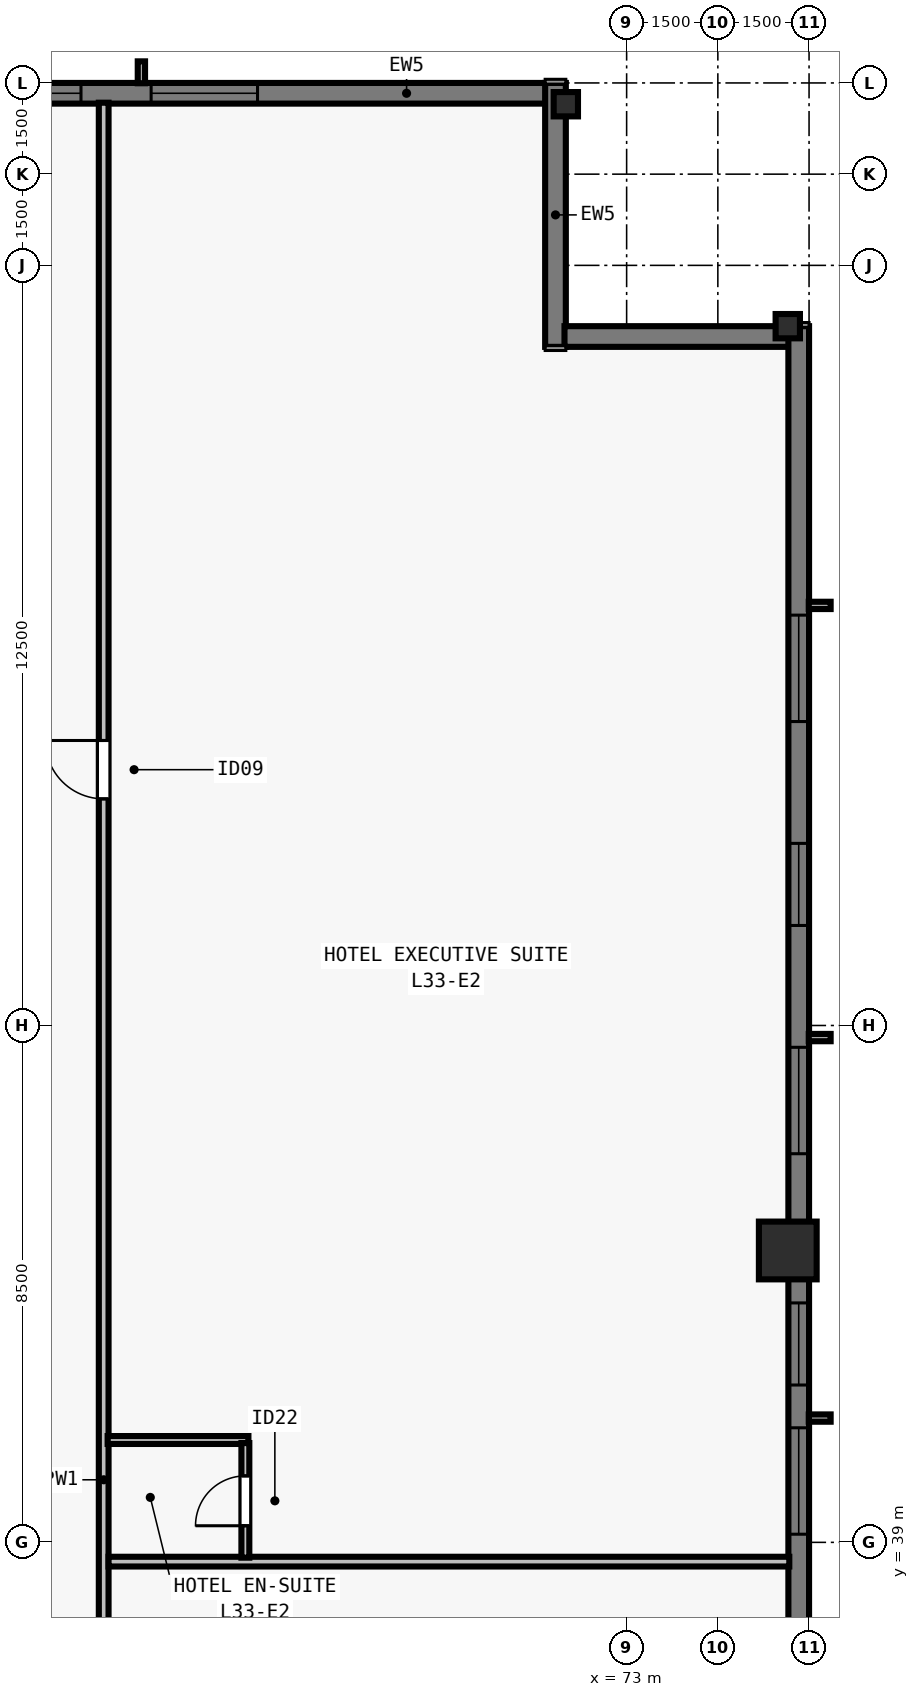
"""IFC4 building model, lengths in metres.
Left out: names, types, materials, properties, quantities, classifications, styles, units other than length and angle.
Written with IfcOpenShell. Run it as: python <this file> out.ifc"""

import sys

from ifc_helpers import new_model, si_unit, direction, frame, frame_2d, origin, origin_2d, place, context, subcontext, project, spatial, rectangle, i_section, extrude, element, fill, save


model = new_model("IFC4")
c1 = context("Model", 3, precision=1e-05, world=origin(), true_north=direction((0.0, 1.0)))
c2 = subcontext(c1, "Body", "Model", "MODEL_VIEW")
j1 = project(units=[si_unit("LENGTHUNIT", "METRE"), si_unit("PLANEANGLEUNIT", "RADIAN")], contexts=[c1])
p1 = place(None, origin())
s1 = spatial("IfcSite", under=j1, at=p1, CompositionType="ELEMENT")
p2 = place(p1, origin())
s2 = spatial("IfcBuilding", under=s1, at=p2, CompositionType="ELEMENT")
p3 = place(p2, frame((0.0, 0.0, 123.5)))
s3 = spatial("IfcBuildingStorey", under=s2, at=p3, CompositionType="ELEMENT", Elevation=123.5)
p4 = place(p3, frame((75.65, 43.8, 0.0), z_axis=(0.0, 0.0, 1.0), x_axis=(0.0, 1.0, 0.0)))
e1 = element("IfcColumn", 1, at=p4, inside=s3, PredefinedType="COLUMN", context=c2, shape_type="SweptSolid", body=[
    extrude(rectangle(XDim=0.95, YDim=0.95, at=origin_2d()), origin(), (0.0, 0.0, 1.0), 3.5),
])
for number, where, z_axis, x_axis in (
    (2, (75.65, 59.0, 0.0), (0.0, 0.0, 1.0), (0.0, 1.0, 0.0)),
    (3, (72.0, 62.65, 0.0), (0.0, 0.0, 1.0), (1.0, 0.0, 0.0)),
):
    element("IfcColumn", number, at=place(p3, frame(where, z_axis=z_axis, x_axis=x_axis)), inside=s3, PredefinedType="COLUMN", context=c2, shape_type="SweptSolid", body=[
        extrude(i_section(OverallWidth=0.4, OverallDepth=0.4, WebThickness=0.022, FlangeThickness=0.036, at=origin_2d()), origin(), (0.0, 0.0, 1.0), 3.5),
    ])
p5 = place(p3, frame((32.0, 62.83, 0.0), z_axis=(0.0, 0.0, 1.0), x_axis=(1.0, 0.0, 0.0)))
e4 = element("IfcWall", 4, at=p5, inside=s3, PredefinedType="SOLIDWALL", context=c2, shape_type="SweptSolid", body=[
    extrude(rectangle(XDim=39.682, YDim=0.34, at=frame_2d((19.841, 0.0))), origin(), (0.0, 0.0, 1.0), 3.28),
])
p6 = place(p5, frame((3.902, 0.0, 0.8)))
e5 = element("IfcOpeningElement", 5, at=p6, cuts=e4, PredefinedType="OPENING", context=c2, shape_type="SweptSolid", body=[
    extrude(rectangle(XDim=1.75, YDim=1.66, at=frame_2d((0.875, 0.83))), frame((0.0, 0.18, 0.0), z_axis=(0.0, -1.0, 0.0), x_axis=(1.0, 0.0, 0.0)), (0.0, 0.0, 1.0), 0.36),
])
p7 = place(p5, frame((8.505, 0.0, 0.8)))
e6 = element("IfcOpeningElement", 6, at=p7, cuts=e4, PredefinedType="OPENING", context=c2, shape_type="SweptSolid", body=[
    extrude(rectangle(XDim=1.35, YDim=1.66, at=frame_2d((0.675, 0.83))), frame((0.0, 0.18, 0.0), z_axis=(0.0, -1.0, 0.0), x_axis=(1.0, 0.0, 0.0)), (0.0, 0.0, 1.0), 0.36),
])
p8 = place(p5, frame((11.859, 0.0, 0.8)))
e7 = element("IfcOpeningElement", 7, at=p8, cuts=e4, PredefinedType="OPENING", context=c2, shape_type="SweptSolid", body=[
    extrude(rectangle(XDim=1.75, YDim=1.66, at=frame_2d((0.875, 0.83))), frame((0.0, 0.18, 0.0), z_axis=(0.0, -1.0, 0.0), x_axis=(1.0, 0.0, 0.0)), (0.0, 0.0, 1.0), 0.36),
])
p9 = place(p5, frame((16.062, 0.0, 0.8)))
e8 = element("IfcOpeningElement", 8, at=p9, cuts=e4, PredefinedType="OPENING", context=c2, shape_type="SweptSolid", body=[
    extrude(rectangle(XDim=1.35, YDim=1.66, at=frame_2d((0.675, 0.83))), frame((0.0, 0.18, 0.0), z_axis=(0.0, -1.0, 0.0), x_axis=(1.0, 0.0, 0.0)), (0.0, 0.0, 1.0), 0.36),
])
p10 = place(p5, frame((17.716, 0.0, 0.8)))
e9 = element("IfcOpeningElement", 9, at=p10, cuts=e4, PredefinedType="OPENING", context=c2, shape_type="SweptSolid", body=[
    extrude(rectangle(XDim=1.75, YDim=1.66, at=frame_2d((0.875, 0.83))), frame((0.0, 0.18, 0.0), z_axis=(0.0, -1.0, 0.0), x_axis=(1.0, 0.0, 0.0)), (0.0, 0.0, 1.0), 0.36),
])
p11 = place(p5, frame((22.719, 0.0, 0.8)))
e10 = element("IfcOpeningElement", 10, at=p11, cuts=e4, PredefinedType="OPENING", context=c2, shape_type="SweptSolid", body=[
    extrude(rectangle(XDim=1.35, YDim=1.66, at=frame_2d((0.675, 0.83))), frame((0.0, 0.18, 0.0), z_axis=(0.0, -1.0, 0.0), x_axis=(1.0, 0.0, 0.0)), (0.0, 0.0, 1.0), 0.36),
])
p12 = place(p5, frame((26.073, 0.0, 0.8)))
e11 = element("IfcOpeningElement", 11, at=p12, cuts=e4, PredefinedType="OPENING", context=c2, shape_type="SweptSolid", body=[
    extrude(rectangle(XDim=1.75, YDim=1.66, at=frame_2d((0.875, 0.83))), frame((0.0, 0.18, 0.0), z_axis=(0.0, -1.0, 0.0), x_axis=(1.0, 0.0, 0.0)), (0.0, 0.0, 1.0), 0.36),
])
p13 = place(p5, frame((30.677, 0.0, 0.8)))
e12 = element("IfcOpeningElement", 12, at=p13, cuts=e4, PredefinedType="OPENING", context=c2, shape_type="SweptSolid", body=[
    extrude(rectangle(XDim=1.35, YDim=1.66, at=frame_2d((0.675, 0.83))), frame((0.0, 0.18, 0.0), z_axis=(0.0, -1.0, 0.0), x_axis=(1.0, 0.0, 0.0)), (0.0, 0.0, 1.0), 0.36),
])
p14 = place(p5, frame((33.18, 0.0, 0.8)))
e13 = element("IfcOpeningElement", 13, at=p14, cuts=e4, PredefinedType="OPENING", context=c2, shape_type="SweptSolid", body=[
    extrude(rectangle(XDim=1.75, YDim=1.66, at=frame_2d((0.875, 0.83))), frame((0.0, 0.18, 0.0), z_axis=(0.0, -1.0, 0.0), x_axis=(1.0, 0.0, 0.0)), (0.0, 0.0, 1.0), 0.36),
])
p15 = place(p3, frame((71.83, 63.0, 0.0), z_axis=(0.0, 0.0, 1.0), x_axis=(0.0, -1.0, 0.0)))
e14 = element("IfcWall", 14, at=p15, inside=s3, PredefinedType="SOLIDWALL", context=c2, shape_type="SweptSolid", body=[
    extrude(rectangle(XDim=4.34, YDim=0.34, at=frame_2d((2.17, 0.0))), origin(), (0.0, 0.0, 1.0), 3.28),
])
p16 = place(p3, frame((71.978, 58.83, 0.0), z_axis=(0.0, 0.0, 1.0), x_axis=(1.0, 0.0, 0.0)))
e15 = element("IfcWall", 15, at=p16, inside=s3, PredefinedType="SOLIDWALL", context=c2, shape_type="SweptSolid", body=[
    extrude(rectangle(XDim=3.704, YDim=0.34, at=frame_2d((1.852, 0.0))), origin(), (0.0, 0.0, 1.0), 3.28),
])
p17 = place(p3, frame((75.83, 59.0, 0.0), z_axis=(0.0, 0.0, 1.0), x_axis=(0.0, -1.0, 0.0)))
e16 = element("IfcWall", 16, at=p17, inside=s3, PredefinedType="SOLIDWALL", context=c2, shape_type="SweptSolid", body=[
    extrude(rectangle(XDim=39.682, YDim=0.34, at=frame_2d((19.841, 0.0))), origin(), (0.0, 0.0, 1.0), 3.28),
])
p18 = place(p17, frame((4.752, 0.0, 0.8)))
e17 = element("IfcOpeningElement", 17, at=p18, cuts=e16, PredefinedType="OPENING", context=c2, shape_type="SweptSolid", body=[
    extrude(rectangle(XDim=1.75, YDim=1.66, at=frame_2d((0.875, 0.83))), frame((0.0, 0.18, 0.0), z_axis=(0.0, -1.0, 0.0), x_axis=(1.0, 0.0, 0.0)), (0.0, 0.0, 1.0), 0.36),
])
p19 = place(p17, frame((8.505, 0.0, 0.8)))
e18 = element("IfcOpeningElement", 18, at=p19, cuts=e16, PredefinedType="OPENING", context=c2, shape_type="SweptSolid", body=[
    extrude(rectangle(XDim=1.35, YDim=1.66, at=frame_2d((0.675, 0.83))), frame((0.0, 0.18, 0.0), z_axis=(0.0, -1.0, 0.0), x_axis=(1.0, 0.0, 0.0)), (0.0, 0.0, 1.0), 0.36),
])
p20 = place(p17, frame((11.859, 0.0, 0.8)))
e19 = element("IfcOpeningElement", 19, at=p20, cuts=e16, PredefinedType="OPENING", context=c2, shape_type="SweptSolid", body=[
    extrude(rectangle(XDim=1.75, YDim=1.66, at=frame_2d((0.875, 0.83))), frame((0.0, 0.18, 0.0), z_axis=(0.0, -1.0, 0.0), x_axis=(1.0, 0.0, 0.0)), (0.0, 0.0, 1.0), 0.36),
])
p21 = place(p17, frame((16.062, 0.0, 0.8)))
e20 = element("IfcOpeningElement", 20, at=p21, cuts=e16, PredefinedType="OPENING", context=c2, shape_type="SweptSolid", body=[
    extrude(rectangle(XDim=1.35, YDim=1.66, at=frame_2d((0.675, 0.83))), frame((0.0, 0.18, 0.0), z_axis=(0.0, -1.0, 0.0), x_axis=(1.0, 0.0, 0.0)), (0.0, 0.0, 1.0), 0.36),
])
p22 = place(p17, frame((18.116, 0.0, 0.8)))
e21 = element("IfcOpeningElement", 21, at=p22, cuts=e16, PredefinedType="OPENING", context=c2, shape_type="SweptSolid", body=[
    extrude(rectangle(XDim=1.75, YDim=1.66, at=frame_2d((0.875, 0.83))), frame((0.0, 0.18, 0.0), z_axis=(0.0, -1.0, 0.0), x_axis=(1.0, 0.0, 0.0)), (0.0, 0.0, 1.0), 0.36),
])
p23 = place(p17, frame((22.719, 0.0, 0.8)))
e22 = element("IfcOpeningElement", 22, at=p23, cuts=e16, PredefinedType="OPENING", context=c2, shape_type="SweptSolid", body=[
    extrude(rectangle(XDim=1.35, YDim=1.66, at=frame_2d((0.675, 0.83))), frame((0.0, 0.18, 0.0), z_axis=(0.0, -1.0, 0.0), x_axis=(1.0, 0.0, 0.0)), (0.0, 0.0, 1.0), 0.36),
])
p24 = place(p17, frame((26.073, 0.0, 0.8)))
e23 = element("IfcOpeningElement", 23, at=p24, cuts=e16, PredefinedType="OPENING", context=c2, shape_type="SweptSolid", body=[
    extrude(rectangle(XDim=1.75, YDim=1.66, at=frame_2d((0.875, 0.83))), frame((0.0, 0.18, 0.0), z_axis=(0.0, -1.0, 0.0), x_axis=(1.0, 0.0, 0.0)), (0.0, 0.0, 1.0), 0.36),
])
p25 = place(p17, frame((29.827, 0.0, 0.8)))
e24 = element("IfcOpeningElement", 24, at=p25, cuts=e16, PredefinedType="OPENING", context=c2, shape_type="SweptSolid", body=[
    extrude(rectangle(XDim=1.35, YDim=1.66, at=frame_2d((0.675, 0.83))), frame((0.0, 0.18, 0.0), z_axis=(0.0, -1.0, 0.0), x_axis=(1.0, 0.0, 0.0)), (0.0, 0.0, 1.0), 0.36),
])
p26 = place(p17, frame((33.18, 0.0, 0.8)))
e25 = element("IfcOpeningElement", 25, at=p26, cuts=e16, PredefinedType="OPENING", context=c2, shape_type="SweptSolid", body=[
    extrude(rectangle(XDim=1.75, YDim=1.66, at=frame_2d((0.875, 0.83))), frame((0.0, 0.18, 0.0), z_axis=(0.0, -1.0, 0.0), x_axis=(1.0, 0.0, 0.0)), (0.0, 0.0, 1.0), 0.36),
])
p27 = place(p3, frame((64.4, 15.325, 0.0), z_axis=(0.0, 0.0, 1.0), x_axis=(0.0, 1.0, 0.0)))
e26 = element("IfcWall", 26, at=p27, inside=s3, PredefinedType="PARTITIONING", context=c2, shape_type="SweptSolid", body=[
    extrude(rectangle(XDim=47.35, YDim=0.16, at=frame_2d((23.675, 0.0))), origin(), (0.0, 0.0, 1.0), 2.555),
])
p28 = place(p27, frame((12.547, 0.0, 0.0)))
e27 = element("IfcOpeningElement", 27, at=p28, cuts=e26, PredefinedType="OPENING", context=c2, shape_type="SweptSolid", body=[
    extrude(rectangle(XDim=0.96, YDim=2.15, at=frame_2d((0.48, 1.075))), frame((0.0, 0.09, 0.0), z_axis=(0.0, -1.0, 0.0), x_axis=(1.0, 0.0, 0.0)), (0.0, 0.0, 1.0), 0.18),
])
p29 = place(p27, frame((35.902, 0.0, 0.0)))
e28 = element("IfcOpeningElement", 28, at=p29, cuts=e26, PredefinedType="OPENING", context=c2, shape_type="SweptSolid", body=[
    extrude(rectangle(XDim=0.96, YDim=2.15, at=frame_2d((0.48, 1.075))), frame((0.0, 0.09, 0.0), z_axis=(0.0, -1.0, 0.0), x_axis=(1.0, 0.0, 0.0)), (0.0, 0.0, 1.0), 0.18),
])
p30 = place(p3, frame((64.48, 38.683, 0.0), z_axis=(0.0, 0.0, 1.0), x_axis=(1.0, 0.0, 0.0)))
e29 = element("IfcWall", 29, at=p30, inside=s3, PredefinedType="PARTITIONING", context=c2, shape_type="SweptSolid", body=[
    extrude(rectangle(XDim=11.195, YDim=0.16, at=frame_2d((5.598, 0.0))), origin(), (0.0, 0.0, 1.0), 3.28),
])
p31 = place(p3, frame((64.465, 40.683, 0.0), z_axis=(0.0, 0.0, 1.0), x_axis=(1.0, 0.0, 0.0)))
e30 = element("IfcWall", 30, at=p31, inside=s3, PredefinedType="PLUMBINGWALL", context=c2, shape_type="SweptSolid", body=[
    extrude(rectangle(XDim=2.315, YDim=0.13, at=frame_2d((1.157, 0.0))), origin(), (0.0, 0.0, 1.0), 3.28),
])
p32 = place(p3, frame((66.73, 38.748, 0.0), z_axis=(0.0, 0.0, 1.0), x_axis=(0.0, 1.0, 0.0)))
e31 = element("IfcWall", 31, at=p32, inside=s3, PredefinedType="PLUMBINGWALL", context=c2, shape_type="SweptSolid", body=[
    extrude(rectangle(XDim=1.885, YDim=0.13, at=frame_2d((0.942, 0.0))), origin(), (0.0, 0.0, 1.0), 3.28),
])
p33 = place(p32, frame((0.525, 0.0, 0.0)))
e32 = element("IfcOpeningElement", 32, at=p33, cuts=e31, PredefinedType="OPENING", context=c2, shape_type="SweptSolid", body=[
    extrude(rectangle(XDim=0.82, YDim=2.1, at=frame_2d((0.41, 1.05))), frame((0.0, 0.075, 0.0), z_axis=(0.0, -1.0, 0.0), x_axis=(1.0, 0.0, 0.0)), (0.0, 0.0, 1.0), 0.15),
])
p34 = place(p13, origin())
e33 = element("IfcWindow", 33, at=p34, inside=s3, PartitioningType="SINGLE_PANEL", PredefinedType="WINDOW", context=c2, shape_type="SweptSolid", body=[
    extrude(rectangle(XDim=1.35, YDim=1.66, at=frame_2d((0.675, 0.83))), frame((0.0, -0.05, 0.0), z_axis=(0.0, -1.0, 0.0), x_axis=(1.0, 0.0, 0.0)), (0.0, 0.0, 1.0), 0.06),
])
fill(e12, e33)
p35 = place(p14, origin())
e34 = element("IfcWindow", 34, at=p35, inside=s3, PartitioningType="SINGLE_PANEL", PredefinedType="WINDOW", context=c2, shape_type="SweptSolid", body=[
    extrude(rectangle(XDim=1.75, YDim=1.66, at=frame_2d((0.875, 0.83))), frame((0.0, -0.05, 0.0), z_axis=(0.0, -1.0, 0.0), x_axis=(1.0, 0.0, 0.0)), (0.0, 0.0, 1.0), 0.06),
])
fill(e13, e34)
p36 = place(p18, origin())
e35 = element("IfcWindow", 35, at=p36, inside=s3, PartitioningType="SINGLE_PANEL", PredefinedType="WINDOW", context=c2, shape_type="SweptSolid", body=[
    extrude(rectangle(XDim=1.75, YDim=1.66, at=frame_2d((0.875, 0.83))), frame((0.0, -0.05, 0.0), z_axis=(0.0, -1.0, 0.0), x_axis=(1.0, 0.0, 0.0)), (0.0, 0.0, 1.0), 0.06),
])
fill(e17, e35)
p37 = place(p19, origin())
e36 = element("IfcWindow", 36, at=p37, inside=s3, PartitioningType="SINGLE_PANEL", PredefinedType="WINDOW", context=c2, shape_type="SweptSolid", body=[
    extrude(rectangle(XDim=1.35, YDim=1.66, at=frame_2d((0.675, 0.83))), frame((0.0, -0.05, 0.0), z_axis=(0.0, -1.0, 0.0), x_axis=(1.0, 0.0, 0.0)), (0.0, 0.0, 1.0), 0.06),
])
fill(e18, e36)
p38 = place(p20, origin())
e37 = element("IfcWindow", 37, at=p38, inside=s3, PartitioningType="SINGLE_PANEL", PredefinedType="WINDOW", context=c2, shape_type="SweptSolid", body=[
    extrude(rectangle(XDim=1.75, YDim=1.66, at=frame_2d((0.875, 0.83))), frame((0.0, -0.05, 0.0), z_axis=(0.0, -1.0, 0.0), x_axis=(1.0, 0.0, 0.0)), (0.0, 0.0, 1.0), 0.06),
])
fill(e19, e37)
p39 = place(p21, origin())
e38 = element("IfcWindow", 38, at=p39, inside=s3, PartitioningType="SINGLE_PANEL", PredefinedType="WINDOW", context=c2, shape_type="SweptSolid", body=[
    extrude(rectangle(XDim=1.35, YDim=1.66, at=frame_2d((0.675, 0.83))), frame((0.0, -0.05, 0.0), z_axis=(0.0, -1.0, 0.0), x_axis=(1.0, 0.0, 0.0)), (0.0, 0.0, 1.0), 0.06),
])
fill(e20, e38)
p40 = place(p22, origin())
e39 = element("IfcWindow", 39, at=p40, inside=s3, PartitioningType="SINGLE_PANEL", PredefinedType="WINDOW", context=c2, shape_type="SweptSolid", body=[
    extrude(rectangle(XDim=1.75, YDim=1.66, at=frame_2d((0.875, 0.83))), frame((0.0, -0.05, 0.0), z_axis=(0.0, -1.0, 0.0), x_axis=(1.0, 0.0, 0.0)), (0.0, 0.0, 1.0), 0.06),
])
fill(e21, e39)
p41 = place(p33, origin())
e40 = element("IfcDoor", 40, at=p41, inside=s3, OperationType="SINGLE_SWING_LEFT", PredefinedType="DOOR", context=c2, shape_type="SweptSolid", body=[
    extrude(rectangle(XDim=0.82, YDim=2.1, at=frame_2d((0.41, 1.05))), frame((0.0, 0.025, 0.0), z_axis=(0.0, -1.0, 0.0), x_axis=(1.0, 0.0, 0.0)), (0.0, 0.0, 1.0), 0.05),
])
fill(e32, e40)
p42 = place(p29, origin())
e41 = element("IfcDoor", 41, at=p42, inside=s3, OperationType="SINGLE_SWING_RIGHT", PredefinedType="DOOR", context=c2, shape_type="SweptSolid", body=[
    extrude(rectangle(XDim=0.96, YDim=2.15, at=frame_2d((0.48, 1.075))), frame((0.0, 0.025, 0.0), z_axis=(0.0, -1.0, 0.0), x_axis=(1.0, 0.0, 0.0)), (0.0, 0.0, 1.0), 0.05),
])
fill(e28, e41)
save(model, sys.argv[1])
